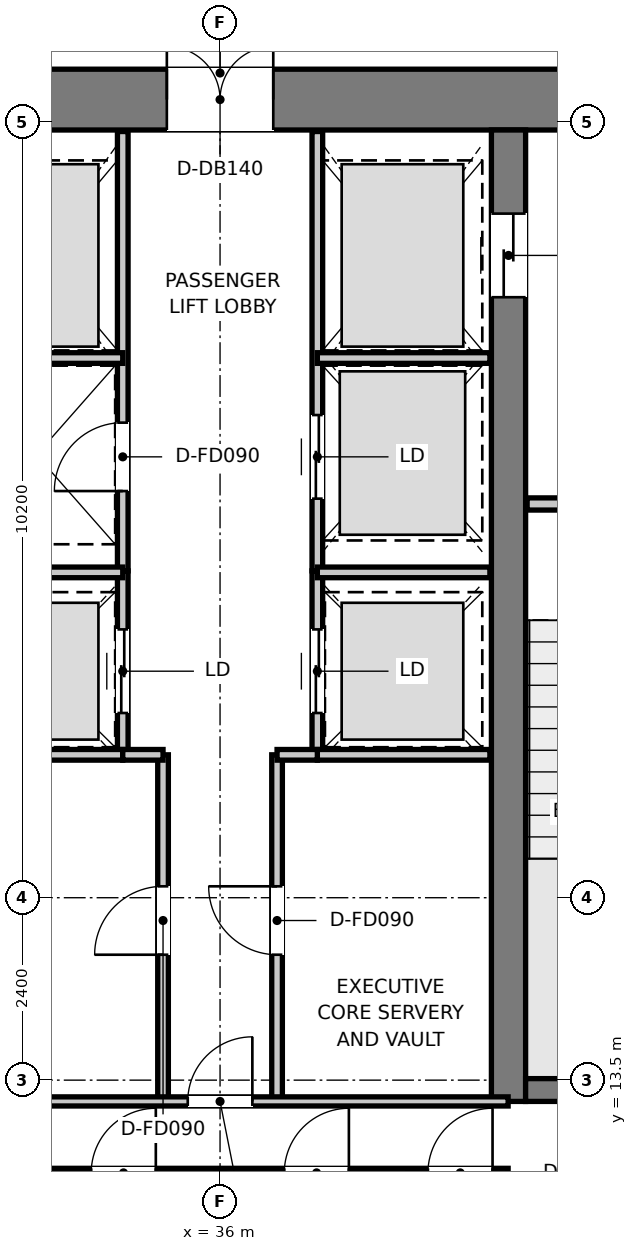
"""IFC4 building model, lengths in metres.
Left out: names, types, materials, properties, quantities, classifications, styles, units other than length and angle.
Written with IfcOpenShell. Run it as: python <this file> out.ifc"""

import sys

from ifc_helpers import new_model, si_unit, direction, frame, frame_2d, origin, place, context, subcontext, project, spatial, rectangle, extrude, element, fill, save


model = new_model("IFC4")
c1 = context("Model", 3, precision=1e-05, world=origin(), true_north=direction((0.0, 1.0)))
c2 = subcontext(c1, "Body", "Model", "MODEL_VIEW")
j1 = project(units=[si_unit("LENGTHUNIT", "METRE"), si_unit("PLANEANGLEUNIT", "RADIAN")], contexts=[c1])
p1 = place(None, origin())
s1 = spatial("IfcSite", under=j1, at=p1, CompositionType="ELEMENT")
p2 = place(p1, origin())
s2 = spatial("IfcBuilding", under=s1, at=p2, CompositionType="ELEMENT")
p3 = place(p2, frame((0.0, 0.0, 347.45)))
s3 = spatial("IfcBuildingStorey", under=s2, at=p3, CompositionType="ELEMENT", Elevation=347.45)
p4 = place(p3, frame((28.08, 26.4, 0.0), z_axis=(0.0, 0.0, 1.0), x_axis=(1.0, 0.0, 0.0)))
e1 = element("IfcWall", 1, at=p4, inside=s3, PredefinedType="SHEAR", context=c2, shape_type="SweptSolid", body=[
    extrude(rectangle(XDim=15.84, YDim=0.8, at=frame_2d((7.92, 0.0))), origin(), (0.0, 0.0, 1.0), 3.95),
])
p5 = place(p4, frame((7.22, 0.0, 0.0)))
e2 = element("IfcOpeningElement", 2, at=p5, cuts=e1, PredefinedType="OPENING", context=c2, shape_type="SweptSolid", body=[
    extrude(rectangle(XDim=1.4, YDim=2.2, at=frame_2d((0.7, 1.1))), frame((0.0, 0.41, 0.0), z_axis=(0.0, -1.0, 0.0), x_axis=(1.0, 0.0, 0.0)), (0.0, 0.0, 1.0), 0.82),
])
p6 = place(p4, frame((1.775, 0.0, 0.0)))
e3 = element("IfcOpeningElement", 3, at=p6, cuts=e1, PredefinedType="OPENING", context=c2, shape_type="SweptSolid", body=[
    extrude(rectangle(XDim=1.05, YDim=2.1, at=frame_2d((0.525, 1.05))), frame((0.0, 0.41, 0.0), z_axis=(0.0, -1.0, 0.0), x_axis=(1.0, 0.0, 0.0)), (0.0, 0.0, 1.0), 0.82),
])
p7 = place(p4, frame((13.015, 0.0, 0.0)))
e4 = element("IfcOpeningElement", 4, at=p7, cuts=e1, PredefinedType="OPENING", context=c2, shape_type="SweptSolid", body=[
    extrude(rectangle(XDim=1.05, YDim=2.1, at=frame_2d((0.525, 1.05))), frame((0.0, 0.41, 0.0), z_axis=(0.0, -1.0, 0.0), x_axis=(1.0, 0.0, 0.0)), (0.0, 0.0, 1.0), 0.82),
])
p8 = place(p3, frame((39.795, 13.22, 0.0), z_axis=(0.0, 0.0, 1.0), x_axis=(0.0, 1.0, 0.0)))
e5 = element("IfcWall", 5, at=p8, inside=s3, PredefinedType="SHEAR", context=c2, shape_type="SweptSolid", body=[
    extrude(rectangle(XDim=12.78, YDim=0.45, at=frame_2d((6.39, 0.0))), origin(), (0.0, 0.0, 1.0), 3.95),
])
p9 = place(p8, frame((10.58, 0.0, 0.0)))
e6 = element("IfcOpeningElement", 6, at=p9, cuts=e5, PredefinedType="OPENING", context=c2, shape_type="SweptSolid", body=[
    extrude(rectangle(XDim=1.1, YDim=2.15, at=frame_2d((0.55, 1.075))), frame((0.0, 0.235, 0.0), z_axis=(0.0, -1.0, 0.0), x_axis=(1.0, 0.0, 0.0)), (0.0, 0.0, 1.0), 0.47),
])
p10 = place(p3, frame((40.02, 13.37, 0.0), z_axis=(0.0, 0.0, 1.0), x_axis=(1.0, 0.0, 0.0)))
e7 = element("IfcWall", 7, at=p10, inside=s3, PredefinedType="SHEAR", context=c2, shape_type="SweptSolid", body=[
    extrude(rectangle(XDim=3.1, YDim=0.3, at=frame_2d((1.55, 0.0))), origin(), (0.0, 0.0, 1.0), 3.95),
])
p11 = place(p3, frame((40.04, 21.08, 0.0), z_axis=(0.0, 0.0, 1.0), x_axis=(1.0, 0.0, 0.0)))
e8 = element("IfcWall", 8, at=p11, inside=s3, PredefinedType="PARTITIONING", context=c2, shape_type="SweptSolid", body=[
    extrude(rectangle(XDim=3.16, YDim=0.16, at=frame_2d((1.58, 0.0))), origin(), (0.0, 0.0, 1.0), 3.67),
])
p12 = place(p11, frame((1.055, 0.0, 0.0)))
e9 = element("IfcOpeningElement", 9, at=p12, cuts=e8, PredefinedType="OPENING", context=c2, shape_type="SweptSolid", body=[
    extrude(rectangle(XDim=1.05, YDim=2.1, at=frame_2d((0.525, 1.05))), frame((0.0, 0.09, 0.0), z_axis=(0.0, -1.0, 0.0), x_axis=(1.0, 0.0, 0.0)), (0.0, 0.0, 1.0), 0.18),
])
p13 = place(p3, frame((34.72, 20.2, 0.0), z_axis=(0.0, 0.0, 1.0), x_axis=(0.0, 1.0, 0.0)))
e10 = element("IfcWall", 10, at=p13, inside=s3, PredefinedType="PARTITIONING", context=c2, shape_type="SweptSolid", body=[
    extrude(rectangle(XDim=5.78, YDim=0.14, at=frame_2d((2.89, 0.0))), origin(), (0.0, 0.0, 1.0), 2.82),
])
p14 = place(p13, frame((1.05, 0.0, 0.0)))
e11 = element("IfcOpeningElement", 11, at=p14, cuts=e10, PredefinedType="OPENING", context=c2, shape_type="SweptSolid", body=[
    extrude(rectangle(XDim=0.9, YDim=2.1, at=frame_2d((0.45, 1.05))), frame((0.0, 0.08, 0.0), z_axis=(0.0, -1.0, 0.0), x_axis=(1.0, 0.0, 0.0)), (0.0, 0.0, 1.0), 0.16),
])
p15 = place(p3, frame((37.28, 20.2, 0.0), z_axis=(0.0, 0.0, 1.0), x_axis=(0.0, 1.0, 0.0)))
e12 = element("IfcWall", 12, at=p15, inside=s3, PredefinedType="PARTITIONING", context=c2, shape_type="SweptSolid", body=[
    extrude(rectangle(XDim=5.78, YDim=0.14, at=frame_2d((2.89, 0.0))), origin(), (0.0, 0.0, 1.0), 2.82),
])
p16 = place(p15, frame((0.95, 0.0, 0.0)))
e13 = element("IfcOpeningElement", 13, at=p16, cuts=e12, PredefinedType="OPENING", context=c2, shape_type="SweptSolid", body=[
    extrude(rectangle(XDim=1.1, YDim=2.15, at=frame_2d((0.55, 1.075))), frame((0.0, 0.08, 0.0), z_axis=(0.0, -1.0, 0.0), x_axis=(1.0, 0.0, 0.0)), (0.0, 0.0, 1.0), 0.16),
])
for number, where, z_axis, x_axis in (
    (14, (32.45, 23.0, 0.0), (0.0, 0.0, 1.0), (1.0, 0.0, 0.0)),
    (15, (37.28, 23.0, 0.0), (0.0, 0.0, 1.0), (1.0, 0.0, 0.0)),
):
    element("IfcWall", number, at=place(p3, frame(where, z_axis=z_axis, x_axis=x_axis)), inside=s3, PredefinedType="PARTITIONING", context=c2, shape_type="SweptSolid", body=[
        extrude(rectangle(XDim=2.27, YDim=0.14, at=frame_2d((1.135, 0.0))), origin(), (0.0, 0.0, 1.0), 2.82),
    ])
p17 = place(p3, frame((34.72, 17.78, 0.0), z_axis=(0.0, 0.0, 1.0), x_axis=(0.0, 1.0, 0.0)))
e16 = element("IfcWall", 16, at=p17, inside=s3, PredefinedType="PARTITIONING", context=c2, shape_type="SweptSolid", body=[
    extrude(rectangle(XDim=2.42, YDim=0.14, at=frame_2d((1.21, 0.0))), origin(), (0.0, 0.0, 1.0), 3.67),
])
p18 = place(p17, frame((0.55, 0.0, 0.0)))
e17 = element("IfcOpeningElement", 17, at=p18, cuts=e16, PredefinedType="OPENING", context=c2, shape_type="SweptSolid", body=[
    extrude(rectangle(XDim=1.1, YDim=2.15, at=frame_2d((0.55, 1.075))), frame((0.0, 0.08, 0.0), z_axis=(0.0, -1.0, 0.0), x_axis=(1.0, 0.0, 0.0)), (0.0, 0.0, 1.0), 0.16),
])
p19 = place(p3, frame((37.28, 17.78, 0.0), z_axis=(0.0, 0.0, 1.0), x_axis=(0.0, 1.0, 0.0)))
e18 = element("IfcWall", 18, at=p19, inside=s3, PredefinedType="PARTITIONING", context=c2, shape_type="SweptSolid", body=[
    extrude(rectangle(XDim=2.42, YDim=0.14, at=frame_2d((1.21, 0.0))), origin(), (0.0, 0.0, 1.0), 3.67),
])
p20 = place(p19, frame((0.55, 0.0, 0.0)))
e19 = element("IfcOpeningElement", 19, at=p20, cuts=e18, PredefinedType="OPENING", context=c2, shape_type="SweptSolid", body=[
    extrude(rectangle(XDim=1.1, YDim=2.15, at=frame_2d((0.55, 1.075))), frame((0.0, 0.08, 0.0), z_axis=(0.0, -1.0, 0.0), x_axis=(1.0, 0.0, 0.0)), (0.0, 0.0, 1.0), 0.16),
])
for number, where, z_axis, x_axis in (
    (20, (32.45, 17.78, 0.0), (0.0, 0.0, 1.0), (1.0, 0.0, 0.0)),
    (21, (32.45, 20.18, 0.0), (0.0, 0.0, 1.0), (1.0, 0.0, 0.0)),
    (22, (37.28, 17.78, 0.0), (0.0, 0.0, 1.0), (1.0, 0.0, 0.0)),
    (23, (37.28, 20.18, 0.0), (0.0, 0.0, 1.0), (1.0, 0.0, 0.0)),
):
    element("IfcWall", number, at=place(p3, frame(where, z_axis=z_axis, x_axis=x_axis)), inside=s3, PredefinedType="PARTITIONING", context=c2, shape_type="SweptSolid", body=[
        extrude(rectangle(XDim=2.27, YDim=0.14, at=frame_2d((1.135, 0.0))), origin(), (0.0, 0.0, 1.0), 3.67),
    ])
p21 = place(p3, frame((35.25, 13.22, 0.0), z_axis=(0.0, 0.0, 1.0), x_axis=(0.0, 1.0, 0.0)))
e24 = element("IfcWall", 24, at=p21, inside=s3, PredefinedType="PARTITIONING", context=c2, shape_type="SweptSolid", body=[
    extrude(rectangle(XDim=4.56, YDim=0.14, at=frame_2d((2.28, 0.0))), origin(), (0.0, 0.0, 1.0), 3.67),
])
p22 = place(p21, frame((1.93, 0.0, 0.0)))
e25 = element("IfcOpeningElement", 25, at=p22, cuts=e24, PredefinedType="OPENING", context=c2, shape_type="SweptSolid", body=[
    extrude(rectangle(XDim=0.9, YDim=2.1, at=frame_2d((0.45, 1.05))), frame((0.0, 0.08, 0.0), z_axis=(0.0, -1.0, 0.0), x_axis=(1.0, 0.0, 0.0)), (0.0, 0.0, 1.0), 0.16),
])
p23 = place(p3, frame((34.72, 17.78, 0.0), z_axis=(0.0, 0.0, 1.0), x_axis=(1.0, 0.0, 0.0)))
e26 = element("IfcWall", 26, at=p23, inside=s3, PredefinedType="PARTITIONING", context=c2, shape_type="SweptSolid", body=[
    extrude(rectangle(XDim=0.53, YDim=0.14, at=frame_2d((0.265, 0.0))), origin(), (0.0, 0.0, 1.0), 3.67),
])
p24 = place(p3, frame((36.75, 13.22, 0.0), z_axis=(0.0, 0.0, 1.0), x_axis=(0.0, 1.0, 0.0)))
e27 = element("IfcWall", 27, at=p24, inside=s3, PredefinedType="PARTITIONING", context=c2, shape_type="SweptSolid", body=[
    extrude(rectangle(XDim=4.56, YDim=0.14, at=frame_2d((2.28, 0.0))), origin(), (0.0, 0.0, 1.0), 3.67),
])
p25 = place(p24, frame((1.93, 0.0, 0.0)))
e28 = element("IfcOpeningElement", 28, at=p25, cuts=e27, PredefinedType="OPENING", context=c2, shape_type="SweptSolid", body=[
    extrude(rectangle(XDim=0.9, YDim=2.1, at=frame_2d((0.45, 1.05))), frame((0.0, 0.08, 0.0), z_axis=(0.0, -1.0, 0.0), x_axis=(1.0, 0.0, 0.0)), (0.0, 0.0, 1.0), 0.16),
])
p26 = place(p3, frame((36.75, 17.78, 0.0), z_axis=(0.0, 0.0, 1.0), x_axis=(1.0, 0.0, 0.0)))
e29 = element("IfcWall", 29, at=p26, inside=s3, PredefinedType="PARTITIONING", context=c2, shape_type="SweptSolid", body=[
    extrude(rectangle(XDim=0.53, YDim=0.14, at=frame_2d((0.265, 0.0))), origin(), (0.0, 0.0, 1.0), 3.67),
])
p27 = place(p3, frame((32.21, 13.22, 0.0), z_axis=(0.0, 0.0, 1.0), x_axis=(1.0, 0.0, 0.0)))
e30 = element("IfcWall", 30, at=p27, inside=s3, PredefinedType="PARTITIONING", context=c2, shape_type="SweptSolid", body=[
    extrude(rectangle(XDim=7.58, YDim=0.12, at=frame_2d((3.79, 0.0))), origin(), (0.0, 0.0, 1.0), 3.67),
])
p28 = place(p27, frame((3.365, 0.0, 0.0)))
e31 = element("IfcOpeningElement", 31, at=p28, cuts=e30, PredefinedType="OPENING", context=c2, shape_type="SweptSolid", body=[
    extrude(rectangle(XDim=0.85, YDim=2.1, at=frame_2d((0.425, 1.05))), frame((0.0, 0.07, 0.0), z_axis=(0.0, -1.0, 0.0), x_axis=(1.0, 0.0, 0.0)), (0.0, 0.0, 1.0), 0.14),
])
p29 = place(p3, frame((32.21, 12.28, 0.0), z_axis=(0.0, 0.0, 1.0), x_axis=(1.0, 0.0, 0.0)))
e32 = element("IfcWall", 32, at=p29, inside=s3, PredefinedType="PARTITIONING", context=c2, shape_type="SweptSolid", body=[
    extrude(rectangle(XDim=7.58, YDim=0.12, at=frame_2d((3.79, 0.0))), origin(), (0.0, 0.0, 1.0), 3.67),
])
p30 = place(p29, frame((0.205, 0.0, 0.0)))
e33 = element("IfcOpeningElement", 33, at=p30, cuts=e32, PredefinedType="OPENING", context=c2, shape_type="SweptSolid", body=[
    extrude(rectangle(XDim=0.85, YDim=2.1, at=frame_2d((0.425, 1.05))), frame((0.0, 0.07, 0.0), z_axis=(0.0, -1.0, 0.0), x_axis=(1.0, 0.0, 0.0)), (0.0, 0.0, 1.0), 0.14),
])
p31 = place(p29, frame((2.095, 0.0, 0.0)))
e34 = element("IfcOpeningElement", 34, at=p31, cuts=e32, PredefinedType="OPENING", context=c2, shape_type="SweptSolid", body=[
    extrude(rectangle(XDim=0.85, YDim=2.1, at=frame_2d((0.425, 1.05))), frame((0.0, 0.07, 0.0), z_axis=(0.0, -1.0, 0.0), x_axis=(1.0, 0.0, 0.0)), (0.0, 0.0, 1.0), 0.14),
])
p32 = place(p29, frame((4.635, 0.0, 0.0)))
e35 = element("IfcOpeningElement", 35, at=p32, cuts=e32, PredefinedType="OPENING", context=c2, shape_type="SweptSolid", body=[
    extrude(rectangle(XDim=0.85, YDim=2.1, at=frame_2d((0.425, 1.05))), frame((0.0, 0.07, 0.0), z_axis=(0.0, -1.0, 0.0), x_axis=(1.0, 0.0, 0.0)), (0.0, 0.0, 1.0), 0.14),
])
p33 = place(p29, frame((6.525, 0.0, 0.0)))
e36 = element("IfcOpeningElement", 36, at=p33, cuts=e32, PredefinedType="OPENING", context=c2, shape_type="SweptSolid", body=[
    extrude(rectangle(XDim=0.85, YDim=2.1, at=frame_2d((0.425, 1.05))), frame((0.0, 0.07, 0.0), z_axis=(0.0, -1.0, 0.0), x_axis=(1.0, 0.0, 0.0)), (0.0, 0.0, 1.0), 0.14),
])
p34 = place(p5, origin())
e37 = element("IfcDoor", 37, at=p34, inside=s3, OperationType="DOUBLE_DOOR_SINGLE_SWING", PredefinedType="DOOR", context=c2, shape_type="SweptSolid", body=[
    extrude(rectangle(XDim=1.4, YDim=2.2, at=frame_2d((0.7, 1.1))), frame((0.0, 0.025, 0.0), z_axis=(0.0, -1.0, 0.0), x_axis=(1.0, 0.0, 0.0)), (0.0, 0.0, 1.0), 0.05),
])
fill(e2, e37)
p35 = place(p9, origin())
e38 = element("IfcDoor", 38, at=p35, inside=s3, OperationType="DOUBLE_DOOR_SLIDING", PredefinedType="DOOR", context=c2, shape_type="SweptSolid", body=[
    extrude(rectangle(XDim=1.1, YDim=2.15, at=frame_2d((0.55, 1.075))), frame((0.0, 0.025, 0.0), z_axis=(0.0, -1.0, 0.0), x_axis=(1.0, 0.0, 0.0)), (0.0, 0.0, 1.0), 0.05),
])
fill(e6, e38)
p36 = place(p14, origin())
e39 = element("IfcDoor", 39, at=p36, inside=s3, OperationType="SINGLE_SWING_LEFT", PredefinedType="DOOR", context=c2, shape_type="SweptSolid", body=[
    extrude(rectangle(XDim=0.9, YDim=2.1, at=frame_2d((0.45, 1.05))), frame((0.0, 0.025, 0.0), z_axis=(0.0, -1.0, 0.0), x_axis=(1.0, 0.0, 0.0)), (0.0, 0.0, 1.0), 0.05),
])
fill(e11, e39)
p37 = place(p16, origin())
e40 = element("IfcDoor", 40, at=p37, inside=s3, OperationType="DOUBLE_DOOR_SLIDING", PredefinedType="DOOR", context=c2, shape_type="SweptSolid", body=[
    extrude(rectangle(XDim=1.1, YDim=2.15, at=frame_2d((0.55, 1.075))), frame((0.0, 0.025, 0.0), z_axis=(0.0, -1.0, 0.0), x_axis=(1.0, 0.0, 0.0)), (0.0, 0.0, 1.0), 0.05),
])
fill(e13, e40)
p38 = place(p18, origin())
e41 = element("IfcDoor", 41, at=p38, inside=s3, OperationType="DOUBLE_DOOR_SLIDING", PredefinedType="DOOR", context=c2, shape_type="SweptSolid", body=[
    extrude(rectangle(XDim=1.1, YDim=2.15, at=frame_2d((0.55, 1.075))), frame((0.0, 0.025, 0.0), z_axis=(0.0, -1.0, 0.0), x_axis=(1.0, 0.0, 0.0)), (0.0, 0.0, 1.0), 0.05),
])
fill(e17, e41)
p39 = place(p20, origin())
e42 = element("IfcDoor", 42, at=p39, inside=s3, OperationType="DOUBLE_DOOR_SLIDING", PredefinedType="DOOR", context=c2, shape_type="SweptSolid", body=[
    extrude(rectangle(XDim=1.1, YDim=2.15, at=frame_2d((0.55, 1.075))), frame((0.0, 0.025, 0.0), z_axis=(0.0, -1.0, 0.0), x_axis=(1.0, 0.0, 0.0)), (0.0, 0.0, 1.0), 0.05),
])
fill(e19, e42)
p40 = place(p22, origin())
e43 = element("IfcDoor", 43, at=p40, inside=s3, OperationType="SINGLE_SWING_LEFT", PredefinedType="DOOR", context=c2, shape_type="SweptSolid", body=[
    extrude(rectangle(XDim=0.9, YDim=2.1, at=frame_2d((0.45, 1.05))), frame((0.0, 0.025, 0.0), z_axis=(0.0, -1.0, 0.0), x_axis=(1.0, 0.0, 0.0)), (0.0, 0.0, 1.0), 0.05),
])
fill(e25, e43)
p41 = place(p25, origin())
e44 = element("IfcDoor", 44, at=p41, inside=s3, OperationType="SINGLE_SWING_RIGHT", PredefinedType="DOOR", context=c2, shape_type="SweptSolid", body=[
    extrude(rectangle(XDim=0.9, YDim=2.1, at=frame_2d((0.45, 1.05))), frame((0.0, 0.025, 0.0), z_axis=(0.0, -1.0, 0.0), x_axis=(1.0, 0.0, 0.0)), (0.0, 0.0, 1.0), 0.05),
])
fill(e28, e44)
p42 = place(p28, origin())
e45 = element("IfcDoor", 45, at=p42, inside=s3, OperationType="SINGLE_SWING_RIGHT", PredefinedType="DOOR", context=c2, shape_type="SweptSolid", body=[
    extrude(rectangle(XDim=0.85, YDim=2.1, at=frame_2d((0.425, 1.05))), frame((0.0, 0.025, 0.0), z_axis=(0.0, -1.0, 0.0), x_axis=(1.0, 0.0, 0.0)), (0.0, 0.0, 1.0), 0.05),
])
fill(e31, e45)
p43 = place(p31, origin())
e46 = element("IfcDoor", 46, at=p43, inside=s3, OperationType="SINGLE_SWING_RIGHT", PredefinedType="DOOR", context=c2, shape_type="SweptSolid", body=[
    extrude(rectangle(XDim=0.85, YDim=2.1, at=frame_2d((0.425, 1.05))), frame((0.0, 0.025, 0.0), z_axis=(0.0, -1.0, 0.0), x_axis=(1.0, 0.0, 0.0)), (0.0, 0.0, 1.0), 0.05),
])
fill(e34, e46)
p44 = place(p32, origin())
e47 = element("IfcDoor", 47, at=p44, inside=s3, OperationType="SINGLE_SWING_RIGHT", PredefinedType="DOOR", context=c2, shape_type="SweptSolid", body=[
    extrude(rectangle(XDim=0.85, YDim=2.1, at=frame_2d((0.425, 1.05))), frame((0.0, 0.025, 0.0), z_axis=(0.0, -1.0, 0.0), x_axis=(1.0, 0.0, 0.0)), (0.0, 0.0, 1.0), 0.05),
])
fill(e35, e47)
p45 = place(p33, origin())
e48 = element("IfcDoor", 48, at=p45, inside=s3, OperationType="SINGLE_SWING_RIGHT", PredefinedType="DOOR", context=c2, shape_type="SweptSolid", body=[
    extrude(rectangle(XDim=0.85, YDim=2.1, at=frame_2d((0.425, 1.05))), frame((0.0, 0.025, 0.0), z_axis=(0.0, -1.0, 0.0), x_axis=(1.0, 0.0, 0.0)), (0.0, 0.0, 1.0), 0.05),
])
fill(e36, e48)
save(model, sys.argv[1])
